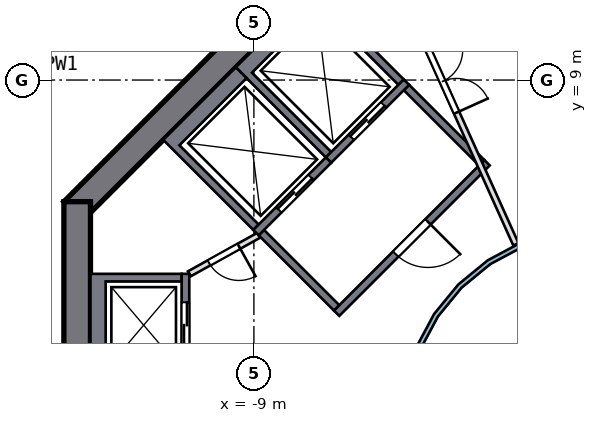
"""IFC4 building model, lengths in metres.
Left out: names, types, materials, properties, quantities, classifications, styles, units other than length and angle.
Written with IfcOpenShell. Run it as: python <this file> out.ifc"""

import sys

from ifc_helpers import new_model, si_unit, direction, frame, frame_2d, origin, place, context, subcontext, project, spatial, polyline, rectangle, outline, extrude, element, fill, save


model = new_model("IFC4")
c1 = context("Model", 3, precision=1e-05, world=origin(), true_north=direction((0.0, 1.0)))
c2 = subcontext(c1, "Body", "Model", "MODEL_VIEW")
j1 = project(units=[si_unit("LENGTHUNIT", "METRE"), si_unit("PLANEANGLEUNIT", "RADIAN")], contexts=[c1])
p1 = place(None, origin())
s1 = spatial("IfcSite", under=j1, at=p1, CompositionType="ELEMENT")
p2 = place(p1, origin())
s2 = spatial("IfcBuilding", under=s1, at=p2, CompositionType="ELEMENT")
p3 = place(p2, frame((0.0, 0.0, 158.5)))
s3 = spatial("IfcBuildingStorey", under=s2, at=p3, CompositionType="ELEMENT", Elevation=158.5)
p4 = place(p3, frame((-5.552, 13.752, 0.0), z_axis=(0.0, 0.0, 1.0), x_axis=(-0.707106781, -0.707106781, 0.0)))
e1 = element("IfcWall", 1, at=p4, inside=s3, PredefinedType="SHEAR", context=c2, shape_type="SweptSolid", body=[
    extrude(rectangle(XDim=11.598, YDim=0.7, at=frame_2d((5.799, 0.0))), origin(), (0.0, 0.0, 1.0), 3.5),
])
p5 = place(p3, frame((-13.65, 5.799, 0.0), z_axis=(0.0, 0.0, 1.0), x_axis=(0.0, -1.0, 0.0)))
e2 = element("IfcWall", 2, at=p5, inside=s3, PredefinedType="SHEAR", context=c2, shape_type="SweptSolid", body=[
    extrude(rectangle(XDim=11.598, YDim=0.7, at=frame_2d((5.799, 0.0))), origin(), (0.0, 0.0, 1.0), 3.5),
])
p6 = place(p5, frame((4.899, 0.0, 0.0)))
e3 = element("IfcOpeningElement", 3, at=p6, cuts=e2, PredefinedType="OPENING", context=c2, shape_type="SweptSolid", body=[
    extrude(rectangle(XDim=1.8, YDim=2.1, at=frame_2d((0.9, 1.05))), frame((0.0, 0.36, 0.0), z_axis=(0.0, -1.0, 0.0), x_axis=(1.0, 0.0, 0.0)), (0.0, 0.0, 1.0), 0.72),
])
p7 = place(p3, origin())
e4 = element("IfcWall", 4, at=p7, inside=s3, PredefinedType="SOLIDWALL", context=c2, shape_type="SweptSolid", body=[
    extrude(outline(polyline([(-13.3, 3.9), (-10.9, 3.9), (-10.9, 3.7), (-12.9, 3.7), (-12.9, 1.4), (-10.9, 1.4), (-10.9, 1.2), (-13.3, 1.2), (-13.3, 3.9)])), origin(), (0.0, 0.0, 1.0), 3.19),
])
p8 = place(p3, frame((-10.8, 1.2, 0.0), z_axis=(0.0, 0.0, 1.0), x_axis=(0.0, 1.0, 0.0)))
e5 = element("IfcWall", 5, at=p8, inside=s3, PredefinedType="SOLIDWALL", context=c2, shape_type="SweptSolid", body=[
    extrude(rectangle(XDim=2.7, YDim=0.2, at=frame_2d((1.35, 0.0))), origin(), (0.0, 0.0, 1.0), 3.19),
])
p9 = place(p8, frame((0.75, 0.0, 0.0)))
e6 = element("IfcOpeningElement", 6, at=p9, cuts=e5, PredefinedType="OPENING", context=c2, shape_type="SweptSolid", body=[
    extrude(rectangle(XDim=1.2, YDim=2.1, at=frame_2d((0.6, 1.05))), frame((0.0, 0.11, 0.0), z_axis=(0.0, -1.0, 0.0), x_axis=(1.0, 0.0, 0.0)), (0.0, 0.0, 1.0), 0.22),
])
p10 = place(p3, origin())
e7 = element("IfcWall", 7, at=p10, inside=s3, PredefinedType="SOLIDWALL", context=c2, shape_type="SweptSolid", body=[
    extrude(outline(polyline([(-9.475, 9.334), (-7.425, 11.385), (-5.056, 9.016), (-5.197, 8.874), (-7.283, 10.96), (-9.051, 9.192), (-6.965, 7.106), (-7.106, 6.965), (-9.475, 9.334)])), origin(), (0.0, 0.0, 1.0), 3.19),
])
p11 = place(p3, frame((-4.985, 8.945, 0.0), z_axis=(0.0, 0.0, 1.0), x_axis=(-0.707106781, -0.707106781, 0.0)))
e8 = element("IfcWall", 8, at=p11, inside=s3, PredefinedType="SOLIDWALL", context=c2, shape_type="SweptSolid", body=[
    extrude(rectangle(XDim=2.9, YDim=0.2, at=frame_2d((1.45, 0.0))), origin(), (0.0, 0.0, 1.0), 3.19),
])
p12 = place(p11, frame((0.85, 0.0, 0.0)))
e9 = element("IfcOpeningElement", 9, at=p12, cuts=e8, PredefinedType="OPENING", context=c2, shape_type="SweptSolid", body=[
    extrude(rectangle(XDim=1.2, YDim=2.1, at=frame_2d((0.6, 1.05))), frame((0.0, 0.11, 0.0), z_axis=(0.0, -1.0, 0.0), x_axis=(1.0, 0.0, 0.0)), (0.0, 0.0, 1.0), 0.22),
])
p13 = place(p3, origin())
e10 = element("IfcWall", 10, at=p13, inside=s3, PredefinedType="SOLIDWALL", context=c2, shape_type="SweptSolid", body=[
    extrude(outline(polyline([(-11.385, 7.425), (-9.475, 9.334), (-9.192, 9.051), (-10.96, 7.283), (-8.874, 5.197), (-9.016, 5.056), (-11.385, 7.425)])), origin(), (0.0, 0.0, 1.0), 3.19),
])
p14 = place(p3, frame((-7.036, 6.894, 0.0), z_axis=(0.0, 0.0, 1.0), x_axis=(-0.707106781, -0.707106781, 0.0)))
e11 = element("IfcWall", 11, at=p14, inside=s3, PredefinedType="SOLIDWALL", context=c2, shape_type="SweptSolid", body=[
    extrude(rectangle(XDim=2.7, YDim=0.2, at=frame_2d((1.35, 0.0))), origin(), (0.0, 0.0, 1.0), 3.19),
])
p15 = place(p14, frame((0.65, 0.0, 0.0)))
e12 = element("IfcOpeningElement", 12, at=p15, cuts=e11, PredefinedType="OPENING", context=c2, shape_type="SweptSolid", body=[
    extrude(rectangle(XDim=1.2, YDim=2.1, at=frame_2d((0.6, 1.05))), frame((0.0, 0.11, 0.0), z_axis=(0.0, -1.0, 0.0), x_axis=(1.0, 0.0, 0.0)), (0.0, 0.0, 1.0), 0.22),
])
p16 = place(p3, frame((-2.864, 6.823, 0.0), z_axis=(0.0, 0.0, 1.0), x_axis=(-0.707106781, -0.707106781, 0.0)))
e13 = element("IfcWall", 13, at=p16, inside=s3, PredefinedType="SOLIDWALL", context=c2, shape_type="SweptSolid", body=[
    extrude(rectangle(XDim=5.6, YDim=0.2, at=frame_2d((2.8, 0.0))), origin(), (0.0, 0.0, 1.0), 3.19),
])
p17 = place(p16, frame((2.2, 0.0, 0.0)))
e14 = element("IfcOpeningElement", 14, at=p17, cuts=e13, PredefinedType="OPENING", context=c2, shape_type="SweptSolid", body=[
    extrude(rectangle(XDim=1.2, YDim=2.1, at=frame_2d((0.6, 1.05))), frame((0.0, 0.11, 0.0), z_axis=(0.0, -1.0, 0.0), x_axis=(1.0, 0.0, 0.0)), (0.0, 0.0, 1.0), 0.22),
])
for number, where, z_axis, x_axis in (
    (15, (-3.005, 6.823, 0.0), (0.0, 0.0, 1.0), (-0.707, 0.707, 0.0)),
    (16, (-6.823, 3.005, 0.0), (0.0, 0.0, 1.0), (-0.707, 0.707, 0.0)),
):
    element("IfcWall", number, at=place(p3, frame(where, z_axis=z_axis, x_axis=x_axis)), inside=s3, PredefinedType="SOLIDWALL", context=c2, shape_type="SweptSolid", body=[
        extrude(rectangle(XDim=2.8, YDim=0.2, at=frame_2d((1.4, 0.0))), origin(), (0.0, 0.0, 1.0), 3.19),
    ])
p18 = place(p3, frame((-8.874, 4.914, 0.0), z_axis=(0.0, 0.0, 1.0), x_axis=(-0.874129705, -0.485692555, 0.0)))
e17 = element("IfcWall", 17, at=p18, inside=s3, PredefinedType="PARTITIONING", context=c2, shape_type="SweptSolid", body=[
    extrude(rectangle(XDim=2.089, YDim=0.15, at=frame_2d((1.044, 0.0))), origin(), (0.0, 0.0, 1.0), 3.19),
])
p19 = place(p18, frame((0.594, 0.0, 0.0)))
e18 = element("IfcOpeningElement", 18, at=p19, cuts=e17, PredefinedType="OPENING", context=c2, shape_type="SweptSolid", body=[
    extrude(rectangle(XDim=0.9, YDim=2.1, at=frame_2d((0.45, 1.05))), frame((0.0, 0.085, 0.0), z_axis=(0.0, -1.0, 0.0), x_axis=(1.0, 0.0, 0.0)), (0.0, 0.0, 1.0), 0.17),
])
p20 = place(p3, frame((-5.828, 12.942, 0.0), z_axis=(0.0, 0.0, 1.0), x_axis=(0.410577476, -0.911825716, 0.0)))
e19 = element("IfcWall", 19, at=p20, inside=s3, PredefinedType="PARTITIONING", context=c2, shape_type="SweptSolid", body=[
    extrude(rectangle(XDim=9.063, YDim=0.15, at=frame_2d((4.532, 0.0))), origin(), (0.0, 0.0, 1.0), 3.19),
])
p21 = place(p20, frame((3.463, 0.0, 0.0)))
e20 = element("IfcOpeningElement", 20, at=p21, cuts=e19, PredefinedType="OPENING", context=c2, shape_type="SweptSolid", body=[
    extrude(rectangle(XDim=1.8, YDim=2.1, at=frame_2d((0.9, 1.05))), frame((0.0, 0.085, 0.0), z_axis=(0.0, -1.0, 0.0), x_axis=(1.0, 0.0, 0.0)), (0.0, 0.0, 1.0), 0.17),
])
p22 = place(p3, origin())
e21 = element("IfcWall", 21, at=p22, inside=s3, PredefinedType="SOLIDWALL", context=c2, shape_type="SweptSolid", body=[
    extrude(outline(polyline([(5.021, -0.999), (4.73, -1.959), (4.257, -2.844), (3.62, -3.62), (2.844, -4.257), (1.959, -4.73), (0.999, -5.021), (0.0, -5.12), (-0.999, -5.021), (-1.959, -4.73), (-2.844, -4.257), (-3.62, -3.62), (-4.257, -2.844), (-4.73, -1.959), (-5.021, -0.999), (-5.12, 0.0), (-5.021, 0.999), (-4.73, 1.959), (-4.257, 2.844), (-3.62, 3.62), (-2.844, 4.257), (-1.959, 4.73), (-0.999, 5.021), (0.0, 5.12), (0.999, 5.021), (1.959, 4.73), (2.844, 4.257), (3.62, 3.62), (4.257, 2.844), (4.73, 1.959), (5.021, 0.999), (5.12, 0.0), (5.021, -0.999)]), holes=[polyline([(4.904, 0.976), (4.619, 1.913), (4.157, 2.778), (3.535, 3.535), (2.778, 4.157), (1.913, 4.619), (0.976, 4.904), (0.0, 5.0), (-0.976, 4.904), (-1.913, 4.619), (-2.778, 4.157), (-3.535, 3.535), (-4.157, 2.778), (-4.619, 1.913), (-4.904, 0.976), (-5.0, 0.0), (-4.904, -0.976), (-4.619, -1.913), (-4.157, -2.778), (-3.535, -3.535), (-2.778, -4.157), (-1.913, -4.619), (-0.976, -4.904), (0.0, -5.0), (0.976, -4.904), (1.913, -4.619), (2.778, -4.157), (3.535, -3.535), (4.157, -2.778), (4.619, -1.913), (4.904, -0.976), (5.0, 0.0), (4.904, 0.976)])]), origin(), (0.0, 0.0, 1.0), 3.19),
])
p23 = place(p3, frame((-17.817, 4.535, 0.0), z_axis=(0.0, 0.0, 1.0), x_axis=(0.489072011, 0.872243411, 0.0)))
e22 = element("IfcWall", 22, at=p23, inside=s3, PredefinedType="SOLIDWALL", context=c2, shape_type="SweptSolid", body=[
    extrude(rectangle(XDim=9.517, YDim=0.2, at=frame_2d((4.758, 0.0))), origin(), (0.0, 0.0, 1.0), 3.19),
])
p24 = place(p23, frame((1.9, 0.0, 0.0)))
e23 = element("IfcOpeningElement", 23, at=p24, cuts=e22, PredefinedType="OPENING", context=c2, shape_type="SweptSolid", body=[
    extrude(rectangle(XDim=1.0, YDim=2.1, at=frame_2d((0.5, 1.05))), frame((0.0, 0.11, 0.0), z_axis=(0.0, -1.0, 0.0), x_axis=(1.0, 0.0, 0.0)), (0.0, 0.0, 1.0), 0.22),
])
p25 = place(p9, origin())
e24 = element("IfcDoor", 24, at=p25, inside=s3, OperationType="DOUBLE_DOOR_SLIDING", PredefinedType="DOOR", context=c2, shape_type="SweptSolid", body=[
    extrude(rectangle(XDim=1.2, YDim=2.1, at=frame_2d((0.6, 1.05))), frame((0.0, 0.025, 0.0), z_axis=(0.0, -1.0, 0.0), x_axis=(1.0, 0.0, 0.0)), (0.0, 0.0, 1.0), 0.05),
])
fill(e6, e24)
p26 = place(p12, origin())
e25 = element("IfcDoor", 25, at=p26, inside=s3, OperationType="DOUBLE_DOOR_SLIDING", PredefinedType="DOOR", context=c2, shape_type="SweptSolid", body=[
    extrude(rectangle(XDim=1.2, YDim=2.1, at=frame_2d((0.6, 1.05))), frame((0.0, 0.025, 0.0), z_axis=(0.0, -1.0, 0.0), x_axis=(1.0, 0.0, 0.0)), (0.0, 0.0, 1.0), 0.05),
])
fill(e9, e25)
p27 = place(p15, origin())
e26 = element("IfcDoor", 26, at=p27, inside=s3, OperationType="DOUBLE_DOOR_SLIDING", PredefinedType="DOOR", context=c2, shape_type="SweptSolid", body=[
    extrude(rectangle(XDim=1.2, YDim=2.1, at=frame_2d((0.6, 1.05))), frame((0.0, 0.025, 0.0), z_axis=(0.0, -1.0, 0.0), x_axis=(1.0, 0.0, 0.0)), (0.0, 0.0, 1.0), 0.05),
])
fill(e12, e26)
p28 = place(p17, origin())
e27 = element("IfcDoor", 27, at=p28, inside=s3, OperationType="SINGLE_SWING_LEFT", PredefinedType="DOOR", context=c2, shape_type="SweptSolid", body=[
    extrude(rectangle(XDim=1.2, YDim=2.1, at=frame_2d((0.6, 1.05))), frame((0.0, 0.025, 0.0), z_axis=(0.0, -1.0, 0.0), x_axis=(1.0, 0.0, 0.0)), (0.0, 0.0, 1.0), 0.05),
])
fill(e14, e27)
p29 = place(p19, origin())
e28 = element("IfcDoor", 28, at=p29, inside=s3, OperationType="SINGLE_SWING_LEFT", PredefinedType="DOOR", context=c2, shape_type="SweptSolid", body=[
    extrude(rectangle(XDim=0.9, YDim=2.1, at=frame_2d((0.45, 1.05))), frame((0.0, 0.025, 0.0), z_axis=(0.0, -1.0, 0.0), x_axis=(1.0, 0.0, 0.0)), (0.0, 0.0, 1.0), 0.05),
])
fill(e18, e28)
p30 = place(p21, origin())
e29 = element("IfcDoor", 29, at=p30, inside=s3, OperationType="DOUBLE_DOOR_SINGLE_SWING", PredefinedType="DOOR", context=c2, shape_type="SweptSolid", body=[
    extrude(rectangle(XDim=1.8, YDim=2.1, at=frame_2d((0.9, 1.05))), frame((0.0, 0.025, 0.0), z_axis=(0.0, -1.0, 0.0), x_axis=(1.0, 0.0, 0.0)), (0.0, 0.0, 1.0), 0.05),
])
fill(e20, e29)
save(model, sys.argv[1])
